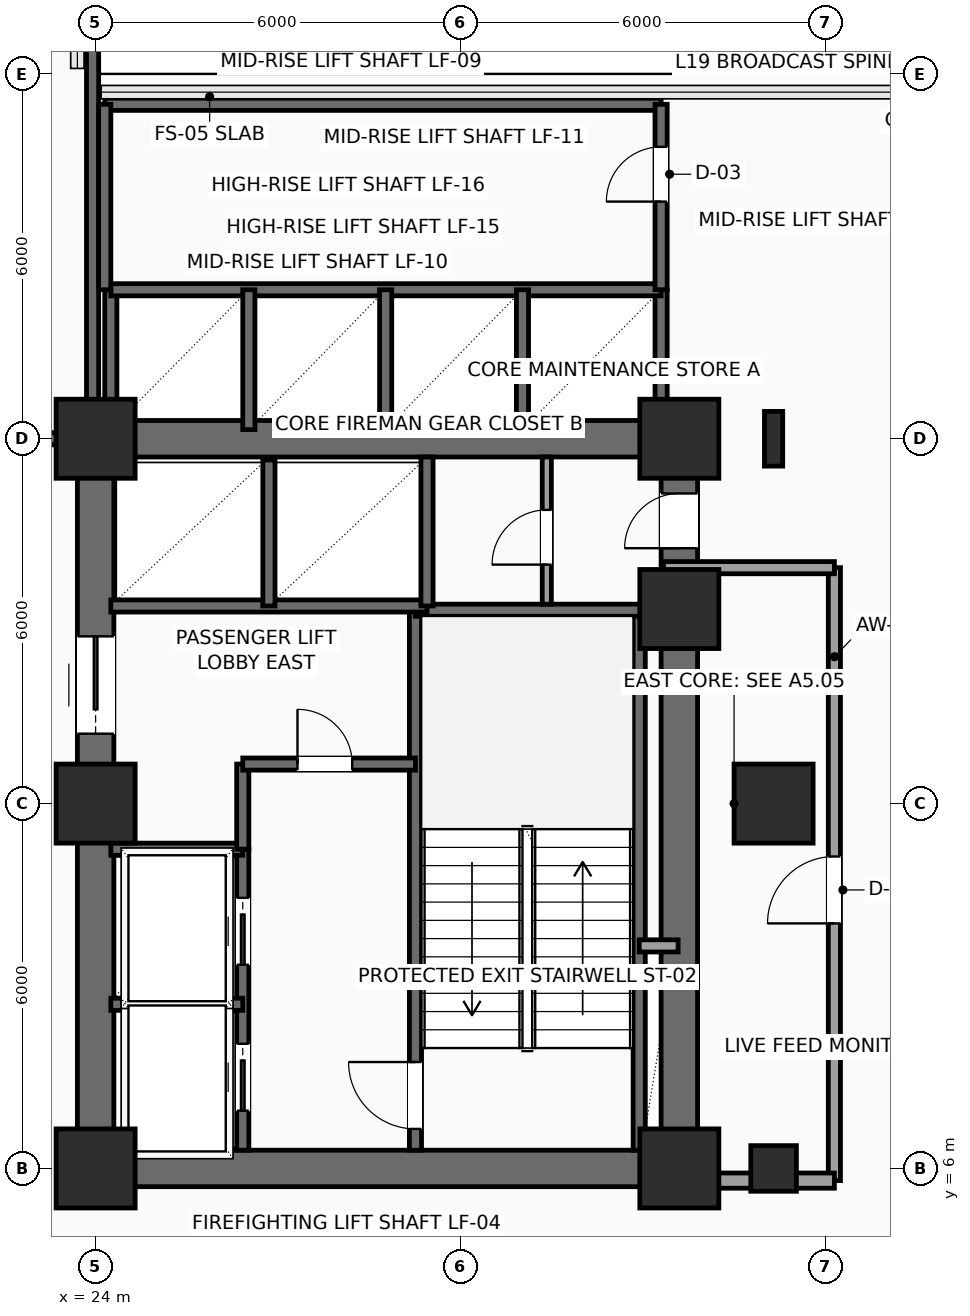
"""IFC4 building model, lengths in metres.
Left out: names, types, materials, properties, quantities, classifications, styles, units other than length and angle.
Written with IfcOpenShell. Run it as: python <this file> out.ifc"""

import sys

from ifc_helpers import new_model, si_unit, direction, frame, frame_2d, origin, origin_2d, place, context, subcontext, project, spatial, rectangle, hollow_rectangle, i_section, extrude, element, fill, save


model = new_model("IFC4")
c1 = context("Model", 3, precision=1e-05, world=origin(), true_north=direction((0.0, 1.0)))
c2 = subcontext(c1, "Body", "Model", "MODEL_VIEW")
j1 = project(units=[si_unit("LENGTHUNIT", "METRE"), si_unit("PLANEANGLEUNIT", "RADIAN")], contexts=[c1])
p1 = place(None, origin())
s1 = spatial("IfcSite", under=j1, at=p1, CompositionType="ELEMENT")
p2 = place(p1, origin())
s2 = spatial("IfcBuilding", under=s1, at=p2, CompositionType="ELEMENT")
p3 = place(p2, frame((0.0, 0.0, 83.1)))
s3 = spatial("IfcBuildingStorey", under=s2, at=p3, CompositionType="ELEMENT", Elevation=83.1)
for number, where, z_axis, x_axis in (
    (1, (24.0, 6.0, 0.0), (0.0, 0.0, 1.0), (1.0, 0.0, 0.0)),
    (2, (24.0, 12.0, 0.0), (0.0, 0.0, 1.0), (1.0, 0.0, 0.0)),
    (3, (24.0, 18.0, 0.0), (0.0, 0.0, 1.0), (1.0, 0.0, 0.0)),
    (4, (33.6, 6.0, 0.0), (0.0, 0.0, 1.0), (1.0, 0.0, 0.0)),
    (5, (33.6, 15.2, 0.0), (0.0, 0.0, 1.0), (1.0, 0.0, 0.0)),
    (6, (33.6, 18.0, 0.0), (0.0, 0.0, 1.0), (1.0, 0.0, 0.0)),
):
    element("IfcColumn", number, at=place(p3, frame(where, z_axis=z_axis, x_axis=x_axis)), inside=s3, PredefinedType="COLUMN", context=c2, shape_type="SweptSolid", body=[
        extrude(rectangle(XDim=1.3, YDim=1.3, at=origin_2d()), origin(), (0.0, 0.0, 1.0), 3.9),
    ])
p4 = place(p3, frame((35.15, 6.0, 0.0), z_axis=(0.0, 0.0, 1.0), x_axis=(1.0, 0.0, 0.0)))
e7 = element("IfcColumn", 7, at=p4, inside=s3, PredefinedType="COLUMN", context=c2, shape_type="SweptSolid", body=[
    extrude(hollow_rectangle(XDim=0.75, YDim=0.75, WallThickness=0.035, InnerFilletRadius=0.035, OuterFilletRadius=0.05, at=origin_2d()), origin(), (0.0, 0.0, 1.0), 3.9),
])
p5 = place(p3, frame((35.15, 12.0, 0.0), z_axis=(0.0, 0.0, 1.0), x_axis=(1.0, 0.0, 0.0)))
e8 = element("IfcColumn", 8, at=p5, inside=s3, PredefinedType="COLUMN", context=c2, shape_type="SweptSolid", body=[
    extrude(rectangle(XDim=1.3, YDim=1.3, at=origin_2d()), origin(), (0.0, 0.0, 1.0), 3.9),
])
p6 = place(p3, frame((35.15, 18.0, 0.0), z_axis=(0.0, 0.0, 1.0), x_axis=(1.0, 0.0, 0.0)))
e9 = element("IfcColumn", 9, at=p6, inside=s3, PredefinedType="COLUMN", context=c2, shape_type="SweptSolid", body=[
    extrude(i_section(OverallWidth=0.3, OverallDepth=0.9, WebThickness=0.019, FlangeThickness=0.035, FilletRadius=0.03, at=origin_2d()), origin(), (0.0, 0.0, 1.0), 3.9),
])
for number, where, z_axis, x_axis in (
    (10, (24.0, 6.0, 0.0), (0.0, 0.0, 1.0), (1.0, 0.0, 0.0)),
    (11, (24.0, 18.0, 0.0), (0.0, 0.0, 1.0), (1.0, 0.0, 0.0)),
):
    element("IfcWall", number, at=place(p3, frame(where, z_axis=z_axis, x_axis=x_axis)), inside=s3, PredefinedType="SHEAR", context=c2, shape_type="SweptSolid", body=[
        extrude(rectangle(XDim=9.6, YDim=0.6, at=frame_2d((4.8, 0.0))), origin(), (0.0, 0.0, 1.0), 3.65),
    ])
p7 = place(p3, frame((24.0, 6.0, 0.0), z_axis=(0.0, 0.0, 1.0), x_axis=(0.0, 1.0, 0.0)))
e12 = element("IfcWall", 12, at=p7, inside=s3, PredefinedType="SHEAR", context=c2, shape_type="SweptSolid", body=[
    extrude(rectangle(XDim=12.0, YDim=0.6, at=frame_2d((6.0, 0.0))), origin(), (0.0, 0.0, 1.0), 3.65),
])
p8 = place(p7, frame((7.15, 0.0, 0.0)))
e13 = element("IfcOpeningElement", 13, at=p8, cuts=e12, PredefinedType="OPENING", context=c2, shape_type="SweptSolid", body=[
    extrude(rectangle(XDim=1.6, YDim=2.3, at=frame_2d((0.8, 1.15))), frame((0.0, 0.31, 0.0), z_axis=(0.0, -1.0, 0.0), x_axis=(1.0, 0.0, 0.0)), (0.0, 0.0, 1.0), 0.62),
])
p9 = place(p3, frame((33.6, 6.0, 0.0), z_axis=(0.0, 0.0, 1.0), x_axis=(0.0, 1.0, 0.0)))
e14 = element("IfcWall", 14, at=p9, inside=s3, PredefinedType="SHEAR", context=c2, shape_type="SweptSolid", body=[
    extrude(rectangle(XDim=12.0, YDim=0.6, at=frame_2d((6.0, 0.0))), origin(), (0.0, 0.0, 1.0), 3.65),
])
p10 = place(p9, frame((10.2, 0.0, 0.0)))
e15 = element("IfcOpeningElement", 15, at=p10, cuts=e14, PredefinedType="OPENING", context=c2, shape_type="SweptSolid", body=[
    extrude(rectangle(XDim=0.9, YDim=2.15, at=frame_2d((0.45, 1.075))), frame((0.0, 0.31, 0.0), z_axis=(0.0, -1.0, 0.0), x_axis=(1.0, 0.0, 0.0)), (0.0, 0.0, 1.0), 0.62),
])
p11 = place(p3, frame((29.26, 6.3, 0.0), z_axis=(0.0, 0.0, 1.0), x_axis=(0.0, 1.0, 0.0)))
e16 = element("IfcWall", 16, at=p11, inside=s3, PredefinedType="SHEAR", context=c2, shape_type="SweptSolid", body=[
    extrude(rectangle(XDim=8.88, YDim=0.2, at=frame_2d((4.44, 0.0))), origin(), (0.0, 0.0, 1.0), 3.65),
])
p12 = place(p11, frame((0.35, 0.0, 0.0)))
e17 = element("IfcOpeningElement", 17, at=p12, cuts=e16, PredefinedType="OPENING", context=c2, shape_type="SweptSolid", body=[
    extrude(rectangle(XDim=1.1, YDim=2.2, at=frame_2d((0.55, 1.1))), frame((0.0, 0.11, 0.0), z_axis=(0.0, -1.0, 0.0), x_axis=(1.0, 0.0, 0.0)), (0.0, 0.0, 1.0), 0.22),
])
p13 = place(p3, frame((32.94, 6.3, 0.0), z_axis=(0.0, 0.0, 1.0), x_axis=(0.0, 1.0, 0.0)))
e18 = element("IfcWall", 18, at=p13, inside=s3, PredefinedType="SHEAR", context=c2, shape_type="SweptSolid", body=[
    extrude(rectangle(XDim=8.88, YDim=0.2, at=frame_2d((4.44, 0.0))), origin(), (0.0, 0.0, 1.0), 3.65),
])
p14 = place(p3, frame((29.26, 15.18, 0.0), z_axis=(0.0, 0.0, 1.0), x_axis=(1.0, 0.0, 0.0)))
e19 = element("IfcWall", 19, at=p14, inside=s3, PredefinedType="SHEAR", context=c2, shape_type="SweptSolid", body=[
    extrude(rectangle(XDim=4.04, YDim=0.2, at=frame_2d((2.02, 0.0))), origin(), (0.0, 0.0, 1.0), 3.65),
])
p15 = place(p3, frame((26.42, 6.3, 0.0), z_axis=(0.0, 0.0, 1.0), x_axis=(0.0, 1.0, 0.0)))
e20 = element("IfcWall", 20, at=p15, inside=s3, PredefinedType="SHEAR", context=c2, shape_type="SweptSolid", body=[
    extrude(rectangle(XDim=4.95, YDim=0.2, at=frame_2d((2.475, 0.0))), origin(), (0.0, 0.0, 1.0), 3.65),
])
p16 = place(p15, frame((0.65, 0.0, 0.0)))
e21 = element("IfcOpeningElement", 21, at=p16, cuts=e20, PredefinedType="OPENING", context=c2, shape_type="SweptSolid", body=[
    extrude(rectangle(XDim=1.1, YDim=2.2, at=frame_2d((0.55, 1.1))), frame((0.0, 0.11, 0.0), z_axis=(0.0, -1.0, 0.0), x_axis=(1.0, 0.0, 0.0)), (0.0, 0.0, 1.0), 0.22),
])
p17 = place(p15, frame((3.05, 0.0, 0.0)))
e22 = element("IfcOpeningElement", 22, at=p17, cuts=e20, PredefinedType="OPENING", context=c2, shape_type="SweptSolid", body=[
    extrude(rectangle(XDim=1.1, YDim=2.2, at=frame_2d((0.55, 1.1))), frame((0.0, 0.11, 0.0), z_axis=(0.0, -1.0, 0.0), x_axis=(1.0, 0.0, 0.0)), (0.0, 0.0, 1.0), 0.22),
])
for number, where, z_axis, x_axis in (
    (23, (24.25, 8.7, 0.0), (0.0, 0.0, 1.0), (1.0, 0.0, 0.0)),
    (24, (24.25, 11.25, 0.0), (0.0, 0.0, 1.0), (1.0, 0.0, 0.0)),
):
    element("IfcWall", number, at=place(p3, frame(where, z_axis=z_axis, x_axis=x_axis)), inside=s3, PredefinedType="SHEAR", context=c2, shape_type="SweptSolid", body=[
        extrude(rectangle(XDim=2.17, YDim=0.2, at=frame_2d((1.085, 0.0))), origin(), (0.0, 0.0, 1.0), 3.65),
    ])
p18 = place(p3, frame((26.42, 11.25, 0.0), z_axis=(0.0, 0.0, 1.0), x_axis=(0.0, 1.0, 0.0)))
e25 = element("IfcWall", 25, at=p18, inside=s3, PredefinedType="SHEAR", context=c2, shape_type="SweptSolid", body=[
    extrude(rectangle(XDim=1.4, YDim=0.2, at=frame_2d((0.7, 0.0))), origin(), (0.0, 0.0, 1.0), 3.65),
])
p19 = place(p3, frame((26.42, 12.65, 0.0), z_axis=(0.0, 0.0, 1.0), x_axis=(1.0, 0.0, 0.0)))
e26 = element("IfcWall", 26, at=p19, inside=s3, PredefinedType="SHEAR", context=c2, shape_type="SweptSolid", body=[
    extrude(rectangle(XDim=2.84, YDim=0.2, at=frame_2d((1.42, 0.0))), origin(), (0.0, 0.0, 1.0), 3.65),
])
p20 = place(p19, frame((0.9, 0.0, 0.0)))
e27 = element("IfcOpeningElement", 27, at=p20, cuts=e26, PredefinedType="OPENING", context=c2, shape_type="SweptSolid", body=[
    extrude(rectangle(XDim=0.9, YDim=2.15, at=frame_2d((0.45, 1.075))), frame((0.0, 0.11, 0.0), z_axis=(0.0, -1.0, 0.0), x_axis=(1.0, 0.0, 0.0)), (0.0, 0.0, 1.0), 0.22),
])
p21 = place(p3, frame((32.94, 9.66, 0.0), z_axis=(0.0, 0.0, 1.0), x_axis=(1.0, 0.0, 0.0)))
e28 = element("IfcWall", 28, at=p21, inside=s3, PredefinedType="SOLIDWALL", context=c2, shape_type="SweptSolid", body=[
    extrude(rectangle(XDim=0.64, YDim=0.2, at=frame_2d((0.32, 0.0))), origin(), (0.0, 0.0, 1.0), 3.65),
])
p22 = place(p3, frame((24.25, 15.25, 0.0), z_axis=(0.0, 0.0, 1.0), x_axis=(1.0, 0.0, 0.0)))
e29 = element("IfcWall", 29, at=p22, inside=s3, PredefinedType="SHEAR", context=c2, shape_type="SweptSolid", body=[
    extrude(rectangle(XDim=5.2, YDim=0.2, at=frame_2d((2.6, 0.0))), origin(), (0.0, 0.0, 1.0), 3.65),
])
p23 = place(p3, frame((26.85, 15.25, 0.0), z_axis=(0.0, 0.0, 1.0), x_axis=(0.0, 1.0, 0.0)))
e30 = element("IfcWall", 30, at=p23, inside=s3, PredefinedType="SHEAR", context=c2, shape_type="SweptSolid", body=[
    extrude(rectangle(XDim=2.4, YDim=0.2, at=frame_2d((1.2, 0.0))), origin(), (0.0, 0.0, 1.0), 3.65),
])
p24 = place(p3, frame((29.45, 15.25, 0.0), z_axis=(0.0, 0.0, 1.0), x_axis=(0.0, 1.0, 0.0)))
e31 = element("IfcWall", 31, at=p24, inside=s3, PredefinedType="SHEAR", context=c2, shape_type="SweptSolid", body=[
    extrude(rectangle(XDim=2.45, YDim=0.2, at=frame_2d((1.225, 0.0))), origin(), (0.0, 0.0, 1.0), 3.65),
])
p25 = place(p3, frame((31.42, 15.28, 0.0), z_axis=(0.0, 0.0, 1.0), x_axis=(0.0, 1.0, 0.0)))
e32 = element("IfcWall", 32, at=p25, inside=s3, PredefinedType="PARTITIONING", context=c2, shape_type="SweptSolid", body=[
    extrude(rectangle(XDim=2.42, YDim=0.15, at=frame_2d((1.21, 0.0))), origin(), (0.0, 0.0, 1.0), 3.65),
])
p26 = place(p25, frame((0.65, 0.0, 0.0)))
e33 = element("IfcOpeningElement", 33, at=p26, cuts=e32, PredefinedType="OPENING", context=c2, shape_type="SweptSolid", body=[
    extrude(rectangle(XDim=0.9, YDim=2.15, at=frame_2d((0.45, 1.075))), frame((0.0, 0.085, 0.0), z_axis=(0.0, -1.0, 0.0), x_axis=(1.0, 0.0, 0.0)), (0.0, 0.0, 1.0), 0.17),
])
p27 = place(p3, frame((20.45, 18.0, 0.0), z_axis=(0.0, 0.0, 1.0), x_axis=(1.0, 0.0, 0.0)))
e34 = element("IfcWall", 34, at=p27, inside=s3, PredefinedType="SHEAR", context=c2, shape_type="SweptSolid", body=[
    extrude(rectangle(XDim=3.5, YDim=0.2, at=frame_2d((1.75, 0.0))), origin(), (0.0, 0.0, 1.0), 3.65),
])
p28 = place(p27, frame((0.95, 0.0, 0.0)))
e35 = element("IfcOpeningElement", 35, at=p28, cuts=e34, PredefinedType="OPENING", context=c2, shape_type="SweptSolid", body=[
    extrude(rectangle(XDim=1.6, YDim=2.3, at=frame_2d((0.8, 1.15))), frame((0.0, 0.11, 0.0), z_axis=(0.0, -1.0, 0.0), x_axis=(1.0, 0.0, 0.0)), (0.0, 0.0, 1.0), 0.22),
])
p29 = place(p3, frame((23.95, 18.0, 0.0), z_axis=(0.0, 0.0, 1.0), x_axis=(0.0, 1.0, 0.0)))
e36 = element("IfcWall", 36, at=p29, inside=s3, PredefinedType="SHEAR", context=c2, shape_type="SweptSolid", body=[
    extrude(rectangle(XDim=9.3, YDim=0.2, at=frame_2d((4.65, 0.0))), origin(), (0.0, 0.0, 1.0), 3.65),
])
for number, where, z_axis, x_axis in (
    (37, (33.3, 18.1, 0.0), (0.0, 0.0, 1.0), (0.0, 1.0, 0.0)),
    (38, (24.25, 18.1, 0.0), (0.0, 0.0, 1.0), (0.0, 1.0, 0.0)),
):
    element("IfcWall", number, at=place(p3, frame(where, z_axis=z_axis, x_axis=x_axis)), inside=s3, PredefinedType="SHEAR", context=c2, shape_type="SweptSolid", body=[
        extrude(rectangle(XDim=2.35, YDim=0.2, at=frame_2d((1.175, 0.0))), origin(), (0.0, 0.0, 1.0), 3.65),
    ])
p30 = place(p3, frame((24.25, 20.45, 0.0), z_axis=(0.0, 0.0, 1.0), x_axis=(1.0, 0.0, 0.0)))
e39 = element("IfcWall", 39, at=p30, inside=s3, PredefinedType="SHEAR", context=c2, shape_type="SweptSolid", body=[
    extrude(rectangle(XDim=9.05, YDim=0.2, at=frame_2d((4.525, 0.0))), origin(), (0.0, 0.0, 1.0), 3.65),
])
for number, where, z_axis, x_axis in (
    (40, (26.52, 18.15, 0.0), (0.0, 0.0, 1.0), (0.0, 1.0, 0.0)),
    (41, (28.77, 18.15, 0.0), (0.0, 0.0, 1.0), (0.0, 1.0, 0.0)),
    (42, (31.02, 18.15, 0.0), (0.0, 0.0, 1.0), (0.0, 1.0, 0.0)),
):
    element("IfcWall", number, at=place(p3, frame(where, z_axis=z_axis, x_axis=x_axis)), inside=s3, PredefinedType="SHEAR", context=c2, shape_type="SweptSolid", body=[
        extrude(rectangle(XDim=2.3, YDim=0.2, at=frame_2d((1.15, 0.0))), origin(), (0.0, 0.0, 1.0), 3.65),
    ])
p31 = place(p3, frame((24.15, 23.5, 0.0), z_axis=(0.0, 0.0, 1.0), x_axis=(1.0, 0.0, 0.0)))
e43 = element("IfcWall", 43, at=p31, inside=s3, PredefinedType="SHEAR", context=c2, shape_type="SweptSolid", body=[
    extrude(rectangle(XDim=9.15, YDim=0.2, at=frame_2d((4.575, 0.0))), origin(), (0.0, 0.0, 1.0), 3.65),
])
p32 = place(p3, frame((33.3, 20.45, 0.0), z_axis=(0.0, 0.0, 1.0), x_axis=(0.0, 1.0, 0.0)))
e44 = element("IfcWall", 44, at=p32, inside=s3, PredefinedType="SHEAR", context=c2, shape_type="SweptSolid", body=[
    extrude(rectangle(XDim=3.05, YDim=0.2, at=frame_2d((1.525, 0.0))), origin(), (0.0, 0.0, 1.0), 3.65),
])
p33 = place(p32, frame((1.45, 0.0, 0.0)))
e45 = element("IfcOpeningElement", 45, at=p33, cuts=e44, PredefinedType="OPENING", context=c2, shape_type="SweptSolid", body=[
    extrude(rectangle(XDim=0.9, YDim=2.15, at=frame_2d((0.45, 1.075))), frame((0.0, 0.11, 0.0), z_axis=(0.0, -1.0, 0.0), x_axis=(1.0, 0.0, 0.0)), (0.0, 0.0, 1.0), 0.22),
])
p34 = place(p3, frame((24.15, 20.45, 0.0), z_axis=(0.0, 0.0, 1.0), x_axis=(0.0, 1.0, 0.0)))
e46 = element("IfcWall", 46, at=p34, inside=s3, PredefinedType="SHEAR", context=c2, shape_type="SweptSolid", body=[
    extrude(rectangle(XDim=3.05, YDim=0.2, at=frame_2d((1.525, 0.0))), origin(), (0.0, 0.0, 1.0), 3.65),
])
p35 = place(p3, frame((36.15, 5.8, 0.0), z_axis=(0.0, 0.0, 1.0), x_axis=(0.0, 1.0, 0.0)))
e47 = element("IfcWall", 47, at=p35, inside=s3, PredefinedType="PARTITIONING", context=c2, shape_type="SweptSolid", body=[
    extrude(rectangle(XDim=10.08, YDim=0.2, at=frame_2d((5.04, 0.0))), origin(), (0.0, 0.0, 1.0), 3.65),
])
p36 = place(p35, frame((4.23, 0.0, 0.0)))
e48 = element("IfcOpeningElement", 48, at=p36, cuts=e47, PredefinedType="OPENING", context=c2, shape_type="SweptSolid", body=[
    extrude(rectangle(XDim=1.1, YDim=2.25, at=frame_2d((0.55, 1.125))), frame((0.0, 0.11, 0.0), z_axis=(0.0, -1.0, 0.0), x_axis=(1.0, 0.0, 0.0)), (0.0, 0.0, 1.0), 0.22),
])
p37 = place(p3, frame((36.15, 15.88, 0.0), z_axis=(0.0, 0.0, 1.0), x_axis=(-1.0, 0.0, 0.0)))
e49 = element("IfcWall", 49, at=p37, inside=s3, PredefinedType="PARTITIONING", context=c2, shape_type="SweptSolid", body=[
    extrude(rectangle(XDim=2.81, YDim=0.2, at=frame_2d((1.405, 0.0))), origin(), (0.0, 0.0, 1.0), 3.65),
])
p38 = place(p3, frame((33.65, 5.8, 0.0), z_axis=(0.0, 0.0, 1.0), x_axis=(1.0, 0.0, 0.0)))
e50 = element("IfcWall", 50, at=p38, inside=s3, PredefinedType="PARTITIONING", context=c2, shape_type="SweptSolid", body=[
    extrude(rectangle(XDim=2.5, YDim=0.25, at=frame_2d((1.25, 0.0))), origin(), (0.0, 0.0, 1.0), 2.992),
])
p39 = place(p8, origin())
e51 = element("IfcDoor", 51, at=p39, inside=s3, OperationType="DOUBLE_DOOR_SLIDING", PredefinedType="DOOR", context=c2, shape_type="SweptSolid", body=[
    extrude(rectangle(XDim=1.6, YDim=2.3, at=frame_2d((0.8, 1.15))), frame((0.0, 0.025, 0.0), z_axis=(0.0, -1.0, 0.0), x_axis=(1.0, 0.0, 0.0)), (0.0, 0.0, 1.0), 0.05),
])
fill(e13, e51)
p40 = place(p10, origin())
e52 = element("IfcDoor", 52, at=p40, inside=s3, OperationType="SINGLE_SWING_LEFT", PredefinedType="DOOR", context=c2, shape_type="SweptSolid", body=[
    extrude(rectangle(XDim=0.9, YDim=2.15, at=frame_2d((0.45, 1.075))), frame((0.0, 0.025, 0.0), z_axis=(0.0, -1.0, 0.0), x_axis=(1.0, 0.0, 0.0)), (0.0, 0.0, 1.0), 0.05),
])
fill(e15, e52)
p41 = place(p12, origin())
e53 = element("IfcDoor", 53, at=p41, inside=s3, OperationType="SINGLE_SWING_RIGHT", PredefinedType="DOOR", context=c2, shape_type="SweptSolid", body=[
    extrude(rectangle(XDim=1.1, YDim=2.2, at=frame_2d((0.55, 1.1))), frame((0.0, 0.025, 0.0), z_axis=(0.0, -1.0, 0.0), x_axis=(1.0, 0.0, 0.0)), (0.0, 0.0, 1.0), 0.05),
])
fill(e17, e53)
p42 = place(p16, origin())
e54 = element("IfcDoor", 54, at=p42, inside=s3, OperationType="SLIDING_TO_LEFT", PredefinedType="DOOR", context=c2, shape_type="SweptSolid", body=[
    extrude(rectangle(XDim=1.1, YDim=2.2, at=frame_2d((0.55, 1.1))), frame((0.0, 0.025, 0.0), z_axis=(0.0, -1.0, 0.0), x_axis=(1.0, 0.0, 0.0)), (0.0, 0.0, 1.0), 0.05),
])
fill(e21, e54)
p43 = place(p17, origin())
e55 = element("IfcDoor", 55, at=p43, inside=s3, OperationType="SLIDING_TO_LEFT", PredefinedType="DOOR", context=c2, shape_type="SweptSolid", body=[
    extrude(rectangle(XDim=1.1, YDim=2.2, at=frame_2d((0.55, 1.1))), frame((0.0, 0.025, 0.0), z_axis=(0.0, -1.0, 0.0), x_axis=(1.0, 0.0, 0.0)), (0.0, 0.0, 1.0), 0.05),
])
fill(e22, e55)
p44 = place(p20, origin())
e56 = element("IfcDoor", 56, at=p44, inside=s3, OperationType="SINGLE_SWING_LEFT", PredefinedType="DOOR", context=c2, shape_type="SweptSolid", body=[
    extrude(rectangle(XDim=0.9, YDim=2.15, at=frame_2d((0.45, 1.075))), frame((0.0, 0.025, 0.0), z_axis=(0.0, -1.0, 0.0), x_axis=(1.0, 0.0, 0.0)), (0.0, 0.0, 1.0), 0.05),
])
fill(e27, e56)
p45 = place(p26, origin())
e57 = element("IfcDoor", 57, at=p45, inside=s3, OperationType="SINGLE_SWING_LEFT", PredefinedType="DOOR", context=c2, shape_type="SweptSolid", body=[
    extrude(rectangle(XDim=0.9, YDim=2.15, at=frame_2d((0.45, 1.075))), frame((0.0, 0.025, 0.0), z_axis=(0.0, -1.0, 0.0), x_axis=(1.0, 0.0, 0.0)), (0.0, 0.0, 1.0), 0.05),
])
fill(e33, e57)
p46 = place(p33, origin())
e58 = element("IfcDoor", 58, at=p46, inside=s3, OperationType="SINGLE_SWING_LEFT", PredefinedType="DOOR", context=c2, shape_type="SweptSolid", body=[
    extrude(rectangle(XDim=0.9, YDim=2.15, at=frame_2d((0.45, 1.075))), frame((0.0, 0.025, 0.0), z_axis=(0.0, -1.0, 0.0), x_axis=(1.0, 0.0, 0.0)), (0.0, 0.0, 1.0), 0.05),
])
fill(e45, e58)
p47 = place(p36, origin())
e59 = element("IfcDoor", 59, at=p47, inside=s3, OperationType="SINGLE_SWING_LEFT", PredefinedType="DOOR", context=c2, shape_type="SweptSolid", body=[
    extrude(rectangle(XDim=1.1, YDim=2.25, at=frame_2d((0.55, 1.125))), frame((0.0, 0.025, 0.0), z_axis=(0.0, -1.0, 0.0), x_axis=(1.0, 0.0, 0.0)), (0.0, 0.0, 1.0), 0.05),
])
fill(e48, e59)
save(model, sys.argv[1])
